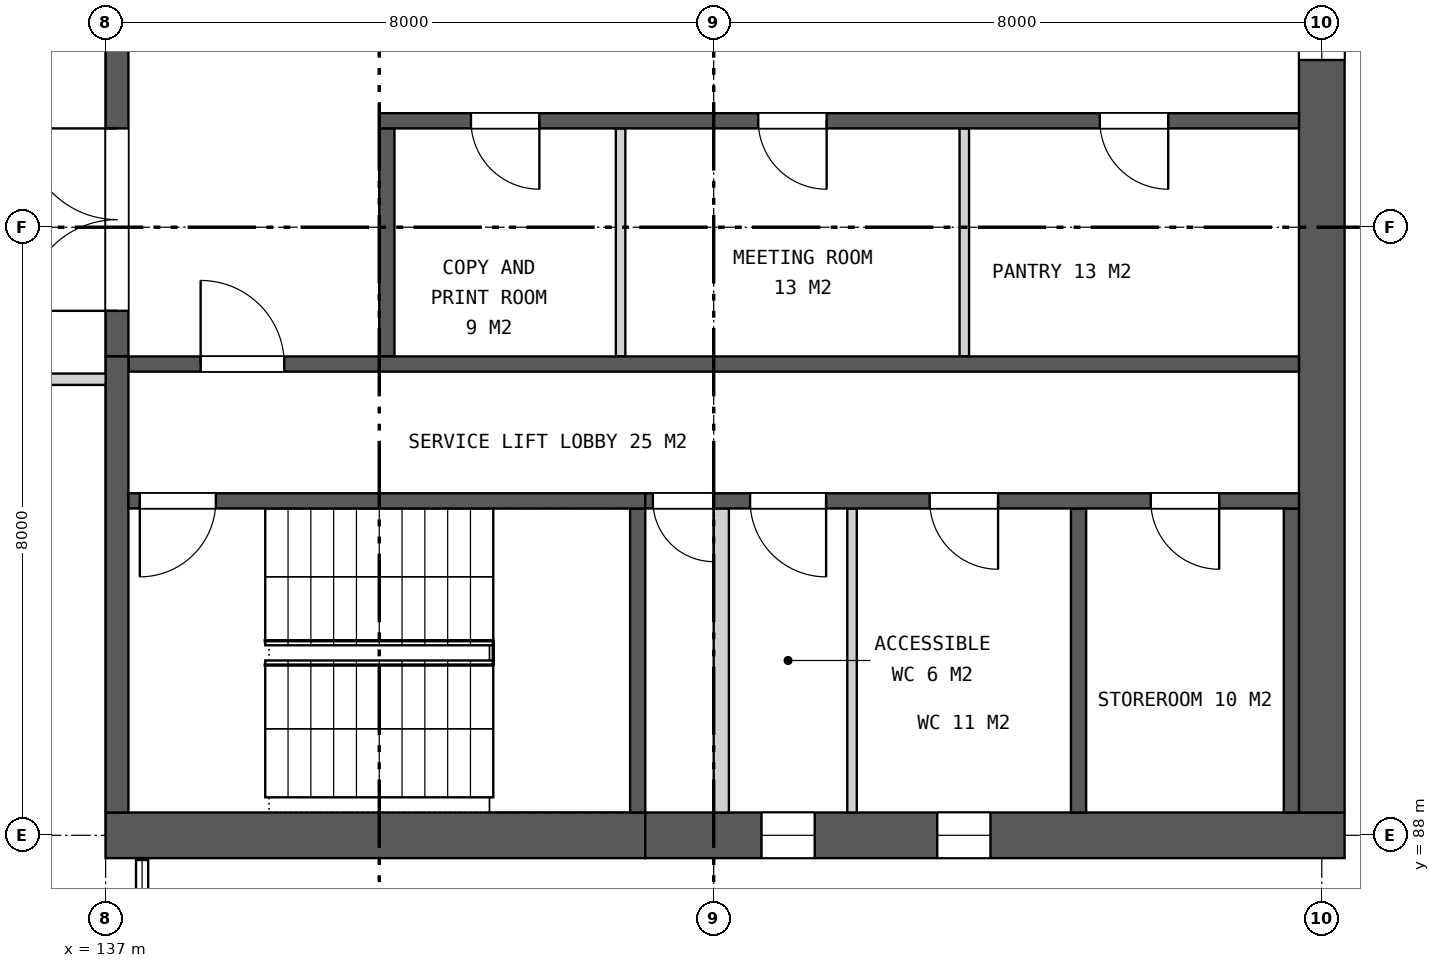
"""IFC4 building model, lengths in metres.
Left out: names, types, materials, properties, quantities, classifications, styles, units other than length and angle.
Written with IfcOpenShell. Run it as: python <this file> out.ifc"""

import sys

from ifc_helpers import new_model, si_unit, direction, frame, frame_2d, origin, place, context, subcontext, project, spatial, rectangle, extrude, element, fill, save


model = new_model("IFC4")
c1 = context("Model", 3, precision=1e-05, world=origin(), true_north=direction((0.0, 1.0)))
c2 = subcontext(c1, "Body", "Model", "MODEL_VIEW")
j1 = project(units=[si_unit("LENGTHUNIT", "METRE"), si_unit("PLANEANGLEUNIT", "RADIAN")], contexts=[c1])
p1 = place(None, origin())
s1 = spatial("IfcSite", under=j1, at=p1, CompositionType="ELEMENT")
p2 = place(p1, origin())
s2 = spatial("IfcBuilding", under=s1, at=p2, CompositionType="ELEMENT")
p3 = place(p2, frame((0.0, 0.0, 233.5)))
s3 = spatial("IfcBuildingStorey", under=s2, at=p3, CompositionType="ELEMENT", Elevation=233.5)
p4 = place(p3, frame((137.0, 88.0, 0.0), z_axis=(0.0, 0.0, 1.0), x_axis=(1.0, 0.0, 0.0)))
e1 = element("IfcWall", 1, at=p4, inside=s3, PredefinedType="SHEAR", context=c2, shape_type="SweptSolid", body=[
    extrude(rectangle(XDim=7.1, YDim=0.6, at=frame_2d((3.55, 0.0))), origin(), (0.0, 0.0, 1.0), 4.2),
])
p5 = place(p3, frame((144.1, 88.0, 0.0), z_axis=(0.0, 0.0, 1.0), x_axis=(1.0, 0.0, 0.0)))
e2 = element("IfcWall", 2, at=p5, inside=s3, PredefinedType="SHEAR", context=c2, shape_type="SweptSolid", body=[
    extrude(rectangle(XDim=9.2, YDim=0.6, at=frame_2d((4.6, 0.0))), origin(), (0.0, 0.0, 1.0), 4.2),
])
p6 = place(p5, frame((1.529, 0.0, 1.5)))
e3 = element("IfcOpeningElement", 3, at=p6, cuts=e2, PredefinedType="OPENING", context=c2, shape_type="SweptSolid", body=[
    extrude(rectangle(XDim=0.7, YDim=0.9, at=frame_2d((0.35, 0.45))), frame((0.0, 0.31, 0.0), z_axis=(0.0, -1.0, 0.0), x_axis=(1.0, 0.0, 0.0)), (0.0, 0.0, 1.0), 0.62),
])
p7 = place(p5, frame((3.841, 0.0, 1.5)))
e4 = element("IfcOpeningElement", 4, at=p7, cuts=e2, PredefinedType="OPENING", context=c2, shape_type="SweptSolid", body=[
    extrude(rectangle(XDim=0.7, YDim=0.9, at=frame_2d((0.35, 0.45))), frame((0.0, 0.31, 0.0), z_axis=(0.0, -1.0, 0.0), x_axis=(1.0, 0.0, 0.0)), (0.0, 0.0, 1.0), 0.62),
])
p8 = place(p3, frame((153.0, 88.3, 0.0), z_axis=(0.0, 0.0, 1.0), x_axis=(0.0, 1.0, 0.0)))
e5 = element("IfcWall", 5, at=p8, inside=s3, PredefinedType="SHEAR", context=c2, shape_type="SweptSolid", body=[
    extrude(rectangle(XDim=23.4, YDim=0.6, at=frame_2d((11.7, 0.0))), origin(), (0.0, 0.0, 1.0), 4.2),
])
p9 = place(p8, frame((9.9, 0.0, 0.15)))
e6 = element("IfcOpeningElement", 6, at=p9, cuts=e5, PredefinedType="OPENING", context=c2, shape_type="SweptSolid", body=[
    extrude(rectangle(XDim=3.6, YDim=3.0, at=frame_2d((1.8, 1.5))), frame((0.0, 0.31, 0.0), z_axis=(0.0, -1.0, 0.0), x_axis=(1.0, 0.0, 0.0)), (0.0, 0.0, 1.0), 0.62),
])
p10 = place(p3, frame((137.15, 94.3, 0.0), z_axis=(0.0, 0.0, 1.0), x_axis=(0.0, 1.0, 0.0)))
e7 = element("IfcWall", 7, at=p10, inside=s3, PredefinedType="SHEAR", context=c2, shape_type="SweptSolid", body=[
    extrude(rectangle(XDim=11.4, YDim=0.3, at=frame_2d((5.7, 0.0))), origin(), (0.0, 0.0, 1.0), 4.2),
])
p11 = place(p10, frame((0.6, 0.0, 0.0)))
e8 = element("IfcOpeningElement", 8, at=p11, cuts=e7, PredefinedType="OPENING", context=c2, shape_type="SweptSolid", body=[
    extrude(rectangle(XDim=2.4, YDim=2.4, at=frame_2d((1.2, 1.2))), frame((0.0, 0.16, 0.0), z_axis=(0.0, -1.0, 0.0), x_axis=(1.0, 0.0, 0.0)), (0.0, 0.0, 1.0), 0.32),
])
p12 = place(p10, frame((4.5, 0.0, 0.0)))
e9 = element("IfcOpeningElement", 9, at=p12, cuts=e7, PredefinedType="OPENING", context=c2, shape_type="SweptSolid", body=[
    extrude(rectangle(XDim=2.4, YDim=2.4, at=frame_2d((1.2, 1.2))), frame((0.0, 0.16, 0.0), z_axis=(0.0, -1.0, 0.0), x_axis=(1.0, 0.0, 0.0)), (0.0, 0.0, 1.0), 0.32),
])
p13 = place(p10, frame((8.4, 0.0, 0.0)))
e10 = element("IfcOpeningElement", 10, at=p13, cuts=e7, PredefinedType="OPENING", context=c2, shape_type="SweptSolid", body=[
    extrude(rectangle(XDim=2.4, YDim=2.4, at=frame_2d((1.2, 1.2))), frame((0.0, 0.16, 0.0), z_axis=(0.0, -1.0, 0.0), x_axis=(1.0, 0.0, 0.0)), (0.0, 0.0, 1.0), 0.32),
])
p14 = place(p3, frame((140.7, 94.3, 0.0), z_axis=(0.0, 0.0, 1.0), x_axis=(0.0, 1.0, 0.0)))
e11 = element("IfcWall", 11, at=p14, inside=s3, PredefinedType="SHEAR", context=c2, shape_type="SweptSolid", body=[
    extrude(rectangle(XDim=3.0, YDim=0.2, at=frame_2d((1.5, 0.0))), origin(), (0.0, 0.0, 1.0), 4.2),
])
for number, where, z_axis, x_axis in (
    (12, (143.775, 94.3, 0.0), (0.0, 0.0, 1.0), (0.0, 1.0, 0.0)),
    (13, (148.297, 94.3, 0.0), (0.0, 0.0, 1.0), (0.0, 1.0, 0.0)),
):
    element("IfcWall", number, at=place(p3, frame(where, z_axis=z_axis, x_axis=x_axis)), inside=s3, PredefinedType="PARTITIONING", context=c2, shape_type="SweptSolid", body=[
        extrude(rectangle(XDim=3.0, YDim=0.125, at=frame_2d((1.5, 0.0))), origin(), (0.0, 0.0, 1.0), 4.2),
    ])
p15 = place(p3, frame((140.6, 97.4, 0.0), z_axis=(0.0, 0.0, 1.0), x_axis=(1.0, 0.0, 0.0)))
e14 = element("IfcWall", 14, at=p15, inside=s3, PredefinedType="SHEAR", context=c2, shape_type="SweptSolid", body=[
    extrude(rectangle(XDim=12.1, YDim=0.2, at=frame_2d((6.05, 0.0))), origin(), (0.0, 0.0, 1.0), 4.2),
])
p16 = place(p15, frame((1.206, 0.0, 0.0)))
e15 = element("IfcOpeningElement", 15, at=p16, cuts=e14, PredefinedType="OPENING", context=c2, shape_type="SweptSolid", body=[
    extrude(rectangle(XDim=0.9, YDim=2.1, at=frame_2d((0.45, 1.05))), frame((0.0, 0.11, 0.0), z_axis=(0.0, -1.0, 0.0), x_axis=(1.0, 0.0, 0.0)), (0.0, 0.0, 1.0), 0.22),
])
p17 = place(p15, frame((4.986, 0.0, 0.0)))
e16 = element("IfcOpeningElement", 16, at=p17, cuts=e14, PredefinedType="OPENING", context=c2, shape_type="SweptSolid", body=[
    extrude(rectangle(XDim=0.9, YDim=2.1, at=frame_2d((0.45, 1.05))), frame((0.0, 0.11, 0.0), z_axis=(0.0, -1.0, 0.0), x_axis=(1.0, 0.0, 0.0)), (0.0, 0.0, 1.0), 0.22),
])
p18 = place(p15, frame((9.48, 0.0, 0.0)))
e17 = element("IfcOpeningElement", 17, at=p18, cuts=e14, PredefinedType="OPENING", context=c2, shape_type="SweptSolid", body=[
    extrude(rectangle(XDim=0.9, YDim=2.1, at=frame_2d((0.45, 1.05))), frame((0.0, 0.11, 0.0), z_axis=(0.0, -1.0, 0.0), x_axis=(1.0, 0.0, 0.0)), (0.0, 0.0, 1.0), 0.22),
])
p19 = place(p3, frame((137.3, 94.2, 0.0), z_axis=(0.0, 0.0, 1.0), x_axis=(1.0, 0.0, 0.0)))
e18 = element("IfcWall", 18, at=p19, inside=s3, PredefinedType="SHEAR", context=c2, shape_type="SweptSolid", body=[
    extrude(rectangle(XDim=15.4, YDim=0.2, at=frame_2d((7.7, 0.0))), origin(), (0.0, 0.0, 1.0), 4.2),
])
p20 = place(p19, frame((0.95, 0.0, 0.0)))
e19 = element("IfcOpeningElement", 19, at=p20, cuts=e18, PredefinedType="OPENING", context=c2, shape_type="SweptSolid", body=[
    extrude(rectangle(XDim=1.1, YDim=2.1, at=frame_2d((0.55, 1.05))), frame((0.0, 0.11, 0.0), z_axis=(0.0, -1.0, 0.0), x_axis=(1.0, 0.0, 0.0)), (0.0, 0.0, 1.0), 0.22),
])
p21 = place(p3, frame((137.15, 88.3, 0.0), z_axis=(0.0, 0.0, 1.0), x_axis=(0.0, 1.0, 0.0)))
e20 = element("IfcWall", 20, at=p21, inside=s3, PredefinedType="SHEAR", context=c2, shape_type="SweptSolid", body=[
    extrude(rectangle(XDim=6.0, YDim=0.3, at=frame_2d((3.0, 0.0))), origin(), (0.0, 0.0, 1.0), 4.2),
])
for number, where, z_axis, x_axis in (
    (21, (144.0, 88.3, 0.0), (0.0, 0.0, 1.0), (0.0, 1.0, 0.0)),
    (22, (149.8, 88.3, 0.0), (0.0, 0.0, 1.0), (0.0, 1.0, 0.0)),
    (23, (152.6, 88.3, 0.0), (0.0, 0.0, 1.0), (0.0, 1.0, 0.0)),
):
    element("IfcWall", number, at=place(p3, frame(where, z_axis=z_axis, x_axis=x_axis)), inside=s3, PredefinedType="SHEAR", context=c2, shape_type="SweptSolid", body=[
        extrude(rectangle(XDim=4.0, YDim=0.2, at=frame_2d((2.0, 0.0))), origin(), (0.0, 0.0, 1.0), 4.2),
    ])
p22 = place(p3, frame((145.1, 88.3, 0.0), z_axis=(0.0, 0.0, 1.0), x_axis=(0.0, 1.0, 0.0)))
e24 = element("IfcWall", 24, at=p22, inside=s3, PredefinedType="PARTITIONING", context=c2, shape_type="SweptSolid", body=[
    extrude(rectangle(XDim=4.0, YDim=0.2, at=frame_2d((2.0, 0.0))), origin(), (0.0, 0.0, 1.0), 4.2),
])
p23 = place(p3, frame((146.82, 88.3, 0.0), z_axis=(0.0, 0.0, 1.0), x_axis=(0.0, 1.0, 0.0)))
e25 = element("IfcWall", 25, at=p23, inside=s3, PredefinedType="PARTITIONING", context=c2, shape_type="SweptSolid", body=[
    extrude(rectangle(XDim=4.0, YDim=0.125, at=frame_2d((2.0, 0.0))), origin(), (0.0, 0.0, 1.0), 4.2),
])
p24 = place(p3, frame((137.3, 92.4, 0.0), z_axis=(0.0, 0.0, 1.0), x_axis=(1.0, 0.0, 0.0)))
e26 = element("IfcWall", 26, at=p24, inside=s3, PredefinedType="SHEAR", context=c2, shape_type="SweptSolid", body=[
    extrude(rectangle(XDim=6.8, YDim=0.2, at=frame_2d((3.4, 0.0))), origin(), (0.0, 0.0, 1.0), 4.2),
])
p25 = place(p24, frame((0.15, 0.0, 0.0)))
e27 = element("IfcOpeningElement", 27, at=p25, cuts=e26, PredefinedType="OPENING", context=c2, shape_type="SweptSolid", body=[
    extrude(rectangle(XDim=1.0, YDim=2.1, at=frame_2d((0.5, 1.05))), frame((0.0, 0.11, 0.0), z_axis=(0.0, -1.0, 0.0), x_axis=(1.0, 0.0, 0.0)), (0.0, 0.0, 1.0), 0.22),
])
p26 = place(p3, frame((144.1, 92.4, 0.0), z_axis=(0.0, 0.0, 1.0), x_axis=(1.0, 0.0, 0.0)))
e28 = element("IfcWall", 28, at=p26, inside=s3, PredefinedType="SHEAR", context=c2, shape_type="SweptSolid", body=[
    extrude(rectangle(XDim=8.6, YDim=0.2, at=frame_2d((4.3, 0.0))), origin(), (0.0, 0.0, 1.0), 4.2),
])
p27 = place(p26, frame((0.1, 0.0, 0.0)))
e29 = element("IfcOpeningElement", 29, at=p27, cuts=e28, PredefinedType="OPENING", context=c2, shape_type="SweptSolid", body=[
    extrude(rectangle(XDim=0.8, YDim=2.1, at=frame_2d((0.4, 1.05))), frame((0.0, 0.11, 0.0), z_axis=(0.0, -1.0, 0.0), x_axis=(1.0, 0.0, 0.0)), (0.0, 0.0, 1.0), 0.22),
])
p28 = place(p26, frame((1.379, 0.0, 0.0)))
e30 = element("IfcOpeningElement", 30, at=p28, cuts=e28, PredefinedType="OPENING", context=c2, shape_type="SweptSolid", body=[
    extrude(rectangle(XDim=1.0, YDim=2.1, at=frame_2d((0.5, 1.05))), frame((0.0, 0.11, 0.0), z_axis=(0.0, -1.0, 0.0), x_axis=(1.0, 0.0, 0.0)), (0.0, 0.0, 1.0), 0.22),
])
p29 = place(p26, frame((3.741, 0.0, 0.0)))
e31 = element("IfcOpeningElement", 31, at=p29, cuts=e28, PredefinedType="OPENING", context=c2, shape_type="SweptSolid", body=[
    extrude(rectangle(XDim=0.9, YDim=2.1, at=frame_2d((0.45, 1.05))), frame((0.0, 0.11, 0.0), z_axis=(0.0, -1.0, 0.0), x_axis=(1.0, 0.0, 0.0)), (0.0, 0.0, 1.0), 0.22),
])
p30 = place(p26, frame((6.65, 0.0, 0.0)))
e32 = element("IfcOpeningElement", 32, at=p30, cuts=e28, PredefinedType="OPENING", context=c2, shape_type="SweptSolid", body=[
    extrude(rectangle(XDim=0.9, YDim=2.1, at=frame_2d((0.45, 1.05))), frame((0.0, 0.11, 0.0), z_axis=(0.0, -1.0, 0.0), x_axis=(1.0, 0.0, 0.0)), (0.0, 0.0, 1.0), 0.22),
])
p31 = place(p3, frame((131.475, 94.0, 0.0), z_axis=(0.0, 0.0, 1.0), x_axis=(1.0, 0.0, 0.0)))
e33 = element("IfcWall", 33, at=p31, inside=s3, PredefinedType="PARTITIONING", context=c2, shape_type="SweptSolid", body=[
    extrude(rectangle(XDim=5.525, YDim=0.15, at=frame_2d((2.762, 0.0))), origin(), (0.0, 0.0, 1.0), 3.255),
])
p32 = place(p6, origin())
e34 = element("IfcWindow", 34, at=p32, inside=s3, PartitioningType="SINGLE_PANEL", PredefinedType="WINDOW", context=c2, shape_type="SweptSolid", body=[
    extrude(rectangle(XDim=0.7, YDim=0.9, at=frame_2d((0.35, 0.45))), frame((0.0, 0.03, 0.0), z_axis=(0.0, -1.0, 0.0), x_axis=(1.0, 0.0, 0.0)), (0.0, 0.0, 1.0), 0.06),
])
fill(e3, e34)
p33 = place(p7, origin())
e35 = element("IfcWindow", 35, at=p33, inside=s3, PartitioningType="SINGLE_PANEL", PredefinedType="WINDOW", context=c2, shape_type="SweptSolid", body=[
    extrude(rectangle(XDim=0.7, YDim=0.9, at=frame_2d((0.35, 0.45))), frame((0.0, 0.03, 0.0), z_axis=(0.0, -1.0, 0.0), x_axis=(1.0, 0.0, 0.0)), (0.0, 0.0, 1.0), 0.06),
])
fill(e4, e35)
p34 = place(p9, origin())
e36 = element("IfcWindow", 36, at=p34, inside=s3, PartitioningType="SINGLE_PANEL", PredefinedType="WINDOW", context=c2, shape_type="SweptSolid", body=[
    extrude(rectangle(XDim=3.6, YDim=3.0, at=frame_2d((1.8, 1.5))), frame((0.0, 0.03, 0.0), z_axis=(0.0, -1.0, 0.0), x_axis=(1.0, 0.0, 0.0)), (0.0, 0.0, 1.0), 0.06),
])
fill(e6, e36)
p35 = place(p11, origin())
e37 = element("IfcDoor", 37, at=p35, inside=s3, OperationType="DOUBLE_DOOR_SINGLE_SWING", PredefinedType="DOOR", context=c2, shape_type="SweptSolid", body=[
    extrude(rectangle(XDim=2.4, YDim=2.4, at=frame_2d((1.2, 1.2))), frame((0.0, 0.025, 0.0), z_axis=(0.0, -1.0, 0.0), x_axis=(1.0, 0.0, 0.0)), (0.0, 0.0, 1.0), 0.05),
])
fill(e8, e37)
p36 = place(p16, frame((0.9, 0.0, 0.0), z_axis=(0.0, 0.0, 1.0), x_axis=(-1.0, 0.0, 0.0)))
e38 = element("IfcDoor", 38, at=p36, inside=s3, OperationType="SINGLE_SWING_LEFT", PredefinedType="DOOR", context=c2, shape_type="SweptSolid", body=[
    extrude(rectangle(XDim=0.9, YDim=2.1, at=frame_2d((0.45, 1.05))), frame((0.0, 0.025, 0.0), z_axis=(0.0, -1.0, 0.0), x_axis=(1.0, 0.0, 0.0)), (0.0, 0.0, 1.0), 0.05),
])
fill(e15, e38)
p37 = place(p17, frame((0.9, 0.0, 0.0), z_axis=(0.0, 0.0, 1.0), x_axis=(-1.0, 0.0, 0.0)))
e39 = element("IfcDoor", 39, at=p37, inside=s3, OperationType="SINGLE_SWING_LEFT", PredefinedType="DOOR", context=c2, shape_type="SweptSolid", body=[
    extrude(rectangle(XDim=0.9, YDim=2.1, at=frame_2d((0.45, 1.05))), frame((0.0, 0.025, 0.0), z_axis=(0.0, -1.0, 0.0), x_axis=(1.0, 0.0, 0.0)), (0.0, 0.0, 1.0), 0.05),
])
fill(e16, e39)
p38 = place(p18, frame((0.9, 0.0, 0.0), z_axis=(0.0, 0.0, 1.0), x_axis=(-1.0, 0.0, 0.0)))
e40 = element("IfcDoor", 40, at=p38, inside=s3, OperationType="SINGLE_SWING_LEFT", PredefinedType="DOOR", context=c2, shape_type="SweptSolid", body=[
    extrude(rectangle(XDim=0.9, YDim=2.1, at=frame_2d((0.45, 1.05))), frame((0.0, 0.025, 0.0), z_axis=(0.0, -1.0, 0.0), x_axis=(1.0, 0.0, 0.0)), (0.0, 0.0, 1.0), 0.05),
])
fill(e17, e40)
p39 = place(p20, origin())
e41 = element("IfcDoor", 41, at=p39, inside=s3, OperationType="SINGLE_SWING_LEFT", PredefinedType="DOOR", context=c2, shape_type="SweptSolid", body=[
    extrude(rectangle(XDim=1.1, YDim=2.1, at=frame_2d((0.55, 1.05))), frame((0.0, 0.025, 0.0), z_axis=(0.0, -1.0, 0.0), x_axis=(1.0, 0.0, 0.0)), (0.0, 0.0, 1.0), 0.05),
])
fill(e19, e41)
p40 = place(p25, frame((1.0, 0.0, 0.0), z_axis=(0.0, 0.0, 1.0), x_axis=(-1.0, 0.0, 0.0)))
e42 = element("IfcDoor", 42, at=p40, inside=s3, OperationType="SINGLE_SWING_RIGHT", PredefinedType="DOOR", context=c2, shape_type="SweptSolid", body=[
    extrude(rectangle(XDim=1.0, YDim=2.1, at=frame_2d((0.5, 1.05))), frame((0.0, 0.025, 0.0), z_axis=(0.0, -1.0, 0.0), x_axis=(1.0, 0.0, 0.0)), (0.0, 0.0, 1.0), 0.05),
])
fill(e27, e42)
p41 = place(p27, frame((0.8, 0.0, 0.0), z_axis=(0.0, 0.0, 1.0), x_axis=(-1.0, 0.0, 0.0)))
e43 = element("IfcDoor", 43, at=p41, inside=s3, OperationType="SINGLE_SWING_LEFT", PredefinedType="DOOR", context=c2, shape_type="SweptSolid", body=[
    extrude(rectangle(XDim=0.8, YDim=2.1, at=frame_2d((0.4, 1.05))), frame((0.0, 0.025, 0.0), z_axis=(0.0, -1.0, 0.0), x_axis=(1.0, 0.0, 0.0)), (0.0, 0.0, 1.0), 0.05),
])
fill(e29, e43)
p42 = place(p28, frame((1.0, 0.0, 0.0), z_axis=(0.0, 0.0, 1.0), x_axis=(-1.0, 0.0, 0.0)))
e44 = element("IfcDoor", 44, at=p42, inside=s3, OperationType="SINGLE_SWING_LEFT", PredefinedType="DOOR", context=c2, shape_type="SweptSolid", body=[
    extrude(rectangle(XDim=1.0, YDim=2.1, at=frame_2d((0.5, 1.05))), frame((0.0, 0.025, 0.0), z_axis=(0.0, -1.0, 0.0), x_axis=(1.0, 0.0, 0.0)), (0.0, 0.0, 1.0), 0.05),
])
fill(e30, e44)
p43 = place(p29, frame((0.9, 0.0, 0.0), z_axis=(0.0, 0.0, 1.0), x_axis=(-1.0, 0.0, 0.0)))
e45 = element("IfcDoor", 45, at=p43, inside=s3, OperationType="SINGLE_SWING_LEFT", PredefinedType="DOOR", context=c2, shape_type="SweptSolid", body=[
    extrude(rectangle(XDim=0.9, YDim=2.1, at=frame_2d((0.45, 1.05))), frame((0.0, 0.025, 0.0), z_axis=(0.0, -1.0, 0.0), x_axis=(1.0, 0.0, 0.0)), (0.0, 0.0, 1.0), 0.05),
])
fill(e31, e45)
p44 = place(p30, frame((0.9, 0.0, 0.0), z_axis=(0.0, 0.0, 1.0), x_axis=(-1.0, 0.0, 0.0)))
e46 = element("IfcDoor", 46, at=p44, inside=s3, OperationType="SINGLE_SWING_LEFT", PredefinedType="DOOR", context=c2, shape_type="SweptSolid", body=[
    extrude(rectangle(XDim=0.9, YDim=2.1, at=frame_2d((0.45, 1.05))), frame((0.0, 0.025, 0.0), z_axis=(0.0, -1.0, 0.0), x_axis=(1.0, 0.0, 0.0)), (0.0, 0.0, 1.0), 0.05),
])
fill(e32, e46)
save(model, sys.argv[1])
